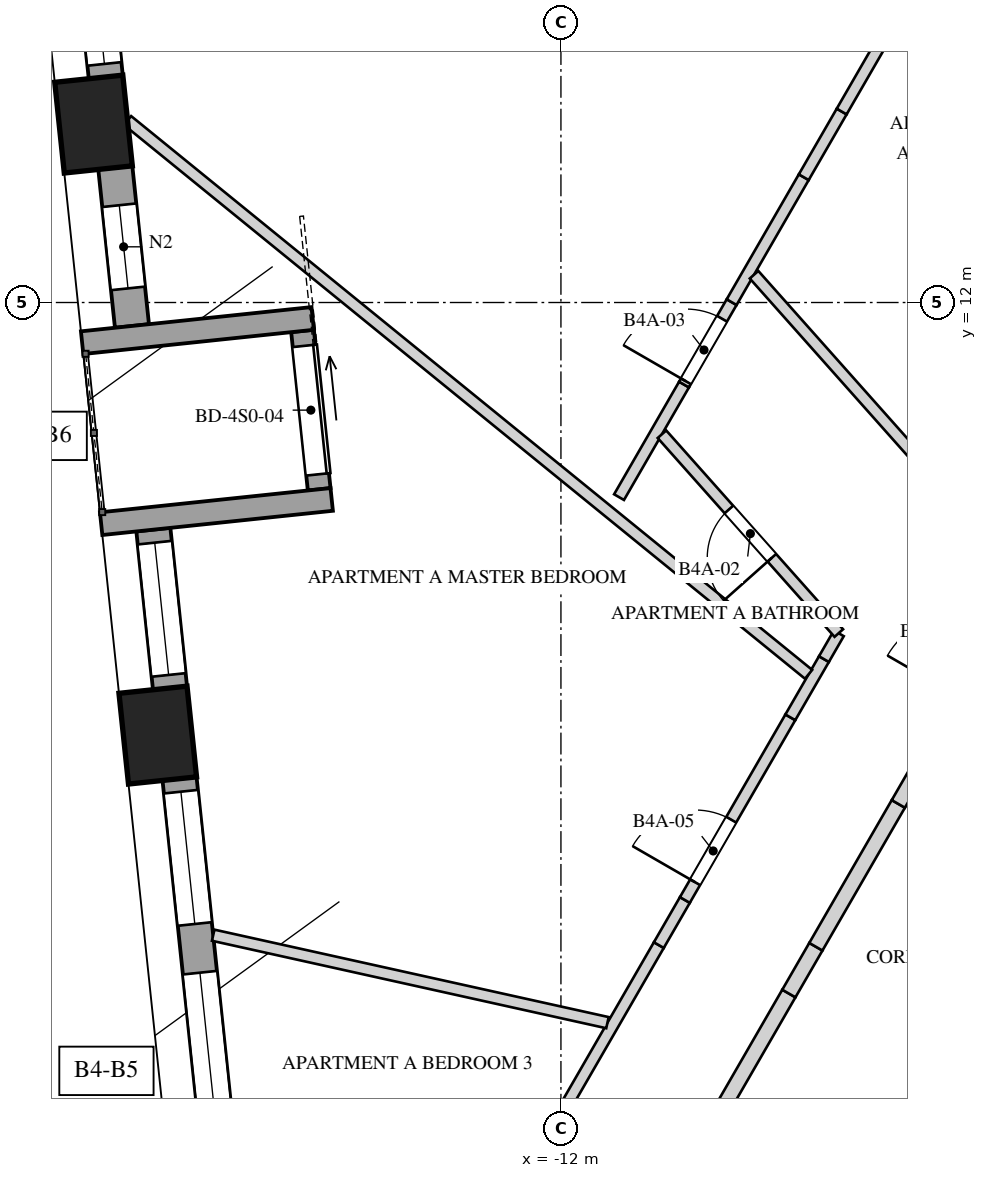
"""IFC4 building model, lengths in metres.
Left out: names, types, materials, properties, quantities, classifications, styles, units other than length and angle.
Written with IfcOpenShell. Run it as: python <this file> out.ifc"""

import sys

from ifc_helpers import new_model, si_unit, direction, frame, frame_2d, origin, origin_2d, place, context, subcontext, project, spatial, polyline, rectangle, outline, extrude, element, fill, save


model = new_model("IFC4")
c1 = context("Model", 3, precision=1e-05, world=origin(), true_north=direction((0.0, 1.0)))
c2 = subcontext(c1, "Body", "Model", "MODEL_VIEW")
j1 = project(units=[si_unit("LENGTHUNIT", "METRE"), si_unit("PLANEANGLEUNIT", "RADIAN")], contexts=[c1])
p1 = place(None, origin())
s1 = spatial("IfcSite", under=j1, at=p1, CompositionType="ELEMENT")
p2 = place(p1, origin())
s2 = spatial("IfcBuilding", under=s1, at=p2, CompositionType="ELEMENT")
p3 = place(p2, frame((0.0, 0.0, 162.8)))
s3 = spatial("IfcBuildingStorey", under=s2, at=p3, CompositionType="ELEMENT", Elevation=162.8)
p4 = place(p3, frame((-1.198, 10.575, 0.0), z_axis=(0.0, 0.0, 1.0), x_axis=(-0.499995289315, -0.866028123483, 0.0)))
e1 = element("IfcWall", 1, at=p4, inside=s3, PredefinedType="SHEAR", context=c2, shape_type="SweptSolid", body=[
    extrude(rectangle(XDim=17.118, YDim=0.85, at=frame_2d((8.559, 0.0))), origin(), (0.0, 0.0, 1.0), 4.0),
])
p5 = place(p4, frame((6.764, 0.0, 0.0)))
e2 = element("IfcOpeningElement", 2, at=p5, cuts=e1, PredefinedType="OPENING", context=c2, shape_type="SweptSolid", body=[
    extrude(rectangle(XDim=1.0, YDim=2.4, at=frame_2d((0.5, 1.2))), frame((0.0, 0.435, 0.0), z_axis=(0.0, -1.0, 0.0), x_axis=(1.0, 0.0, 0.0)), (0.0, 0.0, 1.0), 0.87),
])
p6 = place(p4, frame((14.742, 0.0, 0.0)))
e3 = element("IfcOpeningElement", 3, at=p6, cuts=e1, PredefinedType="OPENING", context=c2, shape_type="SweptSolid", body=[
    extrude(rectangle(XDim=0.8, YDim=2.1, at=frame_2d((0.4, 1.05))), frame((0.0, 0.435, 0.0), z_axis=(0.0, -1.0, 0.0), x_axis=(1.0, 0.0, 0.0)), (0.0, 0.0, 1.0), 0.87),
])
for number, where, z_axis, x_axis in (
    (4, (-18.149, 14.347, -0.35), (0.0, 0.0, 1.0), (0.105, -0.995, 0.0)),
    (5, (-17.304, 6.309, -0.35), (0.0, 0.0, 1.0), (0.105, -0.995, 0.0)),
):
    element("IfcColumn", number, at=place(p3, frame(where, z_axis=z_axis, x_axis=x_axis)), inside=s3, PredefinedType="COLUMN", context=c2, shape_type="SweptSolid", body=[
        extrude(rectangle(XDim=1.2, YDim=0.9, at=origin_2d()), origin(), (0.0, 0.0, 1.0), 4.35),
    ])
p7 = place(p3, frame((-18.634, 21.116, 0.0), z_axis=(0.0, 0.0, 1.0), x_axis=(0.104522399115, -0.994522532718, 0.0)))
e6 = element("IfcWall", 6, at=p7, inside=s3, PredefinedType="SOLIDWALL", context=c2, shape_type="SweptSolid", body=[
    extrude(rectangle(XDim=6.183, YDim=0.45, at=frame_2d((3.091, 0.0))), origin(), (0.0, 0.0, 1.0), 3.3),
])
p8 = place(p7, frame((0.147, 0.0, 0.5)))
e7 = element("IfcOpeningElement", 7, at=p8, cuts=e6, PredefinedType="OPENING", context=c2, shape_type="SweptSolid", body=[
    extrude(rectangle(XDim=1.1, YDim=2.0, at=frame_2d((0.55, 1.0))), frame((0.0, 0.235, 0.0), z_axis=(0.0, -1.0, 0.0), x_axis=(1.0, 0.0, 0.0)), (0.0, 0.0, 1.0), 0.47),
])
p9 = place(p7, frame((1.866, 0.0, 0.5)))
e8 = element("IfcOpeningElement", 8, at=p9, cuts=e6, PredefinedType="OPENING", context=c2, shape_type="SweptSolid", body=[
    extrude(rectangle(XDim=1.75, YDim=2.65, at=frame_2d((0.875, 1.325))), frame((0.0, 0.235, 0.0), z_axis=(0.0, -1.0, 0.0), x_axis=(1.0, 0.0, 0.0)), (0.0, 0.0, 1.0), 0.47),
])
p10 = place(p7, frame((4.261, 0.0, 0.5)))
e9 = element("IfcOpeningElement", 9, at=p10, cuts=e6, PredefinedType="OPENING", context=c2, shape_type="SweptSolid", body=[
    extrude(rectangle(XDim=1.75, YDim=2.65, at=frame_2d((0.875, 1.325))), frame((0.0, 0.235, 0.0), z_axis=(0.0, -1.0, 0.0), x_axis=(1.0, 0.0, 0.0)), (0.0, 0.0, 1.0), 0.47),
])
p11 = place(p3, frame((-17.863, 13.774, 0.0), z_axis=(0.0, 0.0, 1.0), x_axis=(0.104442071108, -0.994530971756, 0.0)))
e10 = element("IfcWall", 10, at=p11, inside=s3, PredefinedType="SOLIDWALL", context=c2, shape_type="SweptSolid", body=[
    extrude(rectangle(XDim=2.094, YDim=0.45, at=frame_2d((1.047, 0.0))), origin(), (0.0, 0.0, 1.0), 3.3),
])
p12 = place(p11, frame((0.497, 0.0, 0.5)))
e11 = element("IfcOpeningElement", 11, at=p12, cuts=e10, PredefinedType="OPENING", context=c2, shape_type="SweptSolid", body=[
    extrude(rectangle(XDim=1.1, YDim=2.65, at=frame_2d((0.55, 1.325))), frame((0.0, 0.235, 0.0), z_axis=(0.0, -1.0, 0.0), x_axis=(1.0, 0.0, 0.0)), (0.0, 0.0, 1.0), 0.47),
])
p13 = place(p3, frame((-17.362, 9.012, 0.0), z_axis=(0.0, 0.0, 1.0), x_axis=(0.104569484464, -0.994517583011, 0.0)))
e12 = element("IfcWall", 12, at=p13, inside=s3, PredefinedType="SOLIDWALL", context=c2, shape_type="SweptSolid", body=[
    extrude(rectangle(XDim=2.094, YDim=0.45, at=frame_2d((1.047, 0.0))), origin(), (0.0, 0.0, 1.0), 3.3),
])
p14 = place(p13, frame((0.172, 0.0, 0.5)))
e13 = element("IfcOpeningElement", 13, at=p14, cuts=e12, PredefinedType="OPENING", context=c2, shape_type="SweptSolid", body=[
    extrude(rectangle(XDim=1.75, YDim=2.65, at=frame_2d((0.875, 1.325))), frame((0.0, 0.235, 0.0), z_axis=(0.0, -1.0, 0.0), x_axis=(1.0, 0.0, 0.0)), (0.0, 0.0, 1.0), 0.47),
])
p15 = place(p3, frame((-17.018, 5.736, 0.0), z_axis=(0.0, 0.0, 1.0), x_axis=(0.104531531326, -0.994521572898, 0.0)))
e14 = element("IfcWall", 14, at=p15, inside=s3, PredefinedType="SOLIDWALL", context=c2, shape_type="SweptSolid", body=[
    extrude(rectangle(XDim=6.883, YDim=0.45, at=frame_2d((3.441, 0.0))), origin(), (0.0, 0.0, 1.0), 3.3),
])
p16 = place(p15, frame((0.172, 0.0, 0.5)))
e15 = element("IfcOpeningElement", 15, at=p16, cuts=e14, PredefinedType="OPENING", context=c2, shape_type="SweptSolid", body=[
    extrude(rectangle(XDim=1.75, YDim=2.65, at=frame_2d((0.875, 1.325))), frame((0.0, 0.235, 0.0), z_axis=(0.0, -1.0, 0.0), x_axis=(1.0, 0.0, 0.0)), (0.0, 0.0, 1.0), 0.47),
])
p17 = place(p15, frame((2.566, 0.0, 0.5)))
e16 = element("IfcOpeningElement", 16, at=p17, cuts=e14, PredefinedType="OPENING", context=c2, shape_type="SweptSolid", body=[
    extrude(rectangle(XDim=1.75, YDim=2.65, at=frame_2d((0.875, 1.325))), frame((0.0, 0.235, 0.0), z_axis=(0.0, -1.0, 0.0), x_axis=(1.0, 0.0, 0.0)), (0.0, 0.0, 1.0), 0.47),
])
p18 = place(p15, frame((4.961, 0.0, 0.5)))
e17 = element("IfcOpeningElement", 17, at=p18, cuts=e14, PredefinedType="OPENING", context=c2, shape_type="SweptSolid", body=[
    extrude(rectangle(XDim=1.75, YDim=2.65, at=frame_2d((0.875, 1.325))), frame((0.0, 0.235, 0.0), z_axis=(0.0, -1.0, 0.0), x_axis=(1.0, 0.0, 0.0)), (0.0, 0.0, 1.0), 0.47),
])
p19 = place(p3, frame((-15.4, 11.625, 0.0), z_axis=(0.0, 0.0, 1.0), x_axis=(0.104569484464, -0.994517583011, 0.0)))
e18 = element("IfcWall", 18, at=p19, inside=s3, PredefinedType="SOLIDWALL", context=c2, shape_type="SweptSolid", body=[
    extrude(rectangle(XDim=2.094, YDim=0.3, at=frame_2d((1.047, 0.0))), origin(), (0.0, 0.0, 1.0), 3.3),
])
p20 = place(p19, frame((0.197, 0.0, 0.0)))
e19 = element("IfcOpeningElement", 19, at=p20, cuts=e18, PredefinedType="OPENING", context=c2, shape_type="SweptSolid", body=[
    extrude(rectangle(XDim=1.7, YDim=2.45, at=frame_2d((0.85, 1.225))), frame((0.0, 0.16, 0.0), z_axis=(0.0, -1.0, 0.0), x_axis=(1.0, 0.0, 0.0)), (0.0, 0.0, 1.0), 0.32),
])
for number, where, z_axis, x_axis in (
    (20, (-18.299, 11.471, 0.0), (0.0, 0.0, 1.0), (0.995, 0.105, 0.0)),
    (21, (-18.049, 9.09, 0.0), (0.0, 0.0, 1.0), (0.995, 0.105, 0.0)),
):
    element("IfcWall", number, at=place(p3, frame(where, z_axis=z_axis, x_axis=x_axis)), inside=s3, PredefinedType="SOLIDWALL", context=c2, shape_type="SweptSolid", body=[
        extrude(rectangle(XDim=3.05, YDim=0.3, at=frame_2d((1.525, 0.0))), origin(), (0.0, 0.0, 1.0), 3.3),
    ])
p21 = place(p3, frame((-13.375, -1.066, 0.0), z_axis=(0.0, 0.0, 1.0), x_axis=(0.500004172341, 0.866022994869, 0.0)))
e22 = element("IfcWall", 22, at=p21, inside=s3, PredefinedType="PARTITIONING", context=c2, shape_type="SweptSolid", body=[
    extrude(rectangle(XDim=5.326, YDim=0.15, at=frame_2d((2.663, 0.0))), origin(), (0.0, 0.0, 1.0), 3.65),
])
p22 = place(p21, frame((1.479, 0.0, 0.0)))
e23 = element("IfcOpeningElement", 23, at=p22, cuts=e22, PredefinedType="OPENING", context=c2, shape_type="SweptSolid", body=[
    extrude(rectangle(XDim=0.95, YDim=2.4, at=frame_2d((0.475, 1.2))), frame((0.0, 0.085, 0.0), z_axis=(0.0, -1.0, 0.0), x_axis=(1.0, 0.0, 0.0)), (0.0, 0.0, 1.0), 0.17),
])
p23 = place(p3, frame((-10.712, 3.546, 0.0), z_axis=(0.0, 0.0, 1.0), x_axis=(0.50012328804, 0.865954211699, 0.0)))
e24 = element("IfcWall", 24, at=p23, inside=s3, PredefinedType="PARTITIONING", context=c2, shape_type="SweptSolid", body=[
    extrude(rectangle(XDim=0.685, YDim=0.15, at=frame_2d((0.343, 0.0))), origin(), (0.0, 0.0, 1.0), 2.95),
])
p24 = place(p3, frame((-10.369, 4.14, 0.0), z_axis=(0.0, 0.0, 1.0), x_axis=(0.50000932403, 0.866020020486, 0.0)))
e25 = element("IfcWall", 25, at=p24, inside=s3, PredefinedType="PARTITIONING", context=c2, shape_type="SweptSolid", body=[
    extrude(rectangle(XDim=2.775, YDim=0.15, at=frame_2d((1.387, 0.0))), origin(), (0.0, 0.0, 1.0), 3.65),
])
p25 = place(p24, frame((0.27, 0.0, 0.0)))
e26 = element("IfcOpeningElement", 26, at=p25, cuts=e25, PredefinedType="OPENING", context=c2, shape_type="SweptSolid", body=[
    extrude(rectangle(XDim=0.95, YDim=2.4, at=frame_2d((0.475, 1.2))), frame((0.0, 0.085, 0.0), z_axis=(0.0, -1.0, 0.0), x_axis=(1.0, 0.0, 0.0)), (0.0, 0.0, 1.0), 0.17),
])
p26 = place(p3, frame((-8.982, 6.543, 0.0), z_axis=(0.0, 0.0, 1.0), x_axis=(0.499969398072, 0.866043071095, 0.0)))
e27 = element("IfcWall", 27, at=p26, inside=s3, PredefinedType="PARTITIONING", context=c2, shape_type="SweptSolid", body=[
    extrude(rectangle(XDim=0.884, YDim=0.15, at=frame_2d((0.442, 0.0))), origin(), (0.0, 0.0, 1.0), 2.55),
])
p27 = place(p3, frame((-8.54, 7.309, 0.0), z_axis=(0.0, 0.0, 1.0), x_axis=(0.499758416753, 0.866164837017, 0.0)))
e28 = element("IfcWall", 28, at=p27, inside=s3, PredefinedType="PARTITIONING", context=c2, shape_type="SweptSolid", body=[
    extrude(rectangle(XDim=0.392, YDim=0.15, at=frame_2d((0.196, 0.0))), origin(), (0.0, 0.0, 1.0), 3.65),
])
p28 = place(p3, frame((-11.235, 9.44, 0.0), z_axis=(0.0, 0.0, 1.0), x_axis=(0.499977863513, 0.866038183914, 0.0)))
e29 = element("IfcWall", 29, at=p28, inside=s3, PredefinedType="PARTITIONING", context=c2, shape_type="SweptSolid", body=[
    extrude(rectangle(XDim=1.71, YDim=0.15, at=frame_2d((0.855, 0.0))), origin(), (0.0, 0.0, 1.0), 3.65),
])
p29 = place(p3, frame((-10.38, 10.921, 0.0), z_axis=(0.0, 0.0, 1.0), x_axis=(0.499998165157, 0.866026463129, 0.0)))
e30 = element("IfcWall", 30, at=p29, inside=s3, PredefinedType="PARTITIONING", context=c2, shape_type="SweptSolid", body=[
    extrude(outline(polyline([(0.0, 0.0), (1.252, 0.0), (1.252, 2.55), (0.325, 2.55), (0.325, 3.65), (0.0, 3.65), (0.0, 0.0)])), frame((0.0, 0.075, 0.0), z_axis=(0.0, -1.0, 0.0), x_axis=(1.0, 0.0, 0.0)), (0.0, 0.0, 1.0), 0.15),
])
p30 = place(p29, frame((0.05, 0.0, 0.0)))
e31 = element("IfcOpeningElement", 31, at=p30, cuts=e30, PredefinedType="OPENING", context=c2, shape_type="SweptSolid", body=[
    extrude(rectangle(XDim=0.95, YDim=2.4, at=frame_2d((0.475, 1.2))), frame((0.0, 0.085, 0.0), z_axis=(0.0, -1.0, 0.0), x_axis=(1.0, 0.0, 0.0)), (0.0, 0.0, 1.0), 0.17),
])
p31 = place(p3, frame((-9.754, 12.005, 0.0), z_axis=(0.0, 0.0, 1.0), x_axis=(0.499971120268, 0.866042076863, 0.0)))
e32 = element("IfcWall", 32, at=p31, inside=s3, PredefinedType="PARTITIONING", context=c2, shape_type="SweptSolid", body=[
    extrude(rectangle(XDim=1.898, YDim=0.15, at=frame_2d((0.949, 0.0))), origin(), (0.0, 0.0, 1.0), 3.65),
])
p32 = place(p3, frame((-8.805, 13.649, 0.0), z_axis=(0.0, 0.0, 1.0), x_axis=(0.499955472713, 0.866051110099, 0.0)))
e33 = element("IfcWall", 33, at=p32, inside=s3, PredefinedType="PARTITIONING", context=c2, shape_type="SweptSolid", body=[
    extrude(rectangle(XDim=0.998, YDim=0.15, at=frame_2d((0.499, 0.0))), origin(), (0.0, 0.0, 1.0), 2.55),
])
p33 = place(p3, frame((-8.307, 14.513, 0.0), z_axis=(0.0, 0.0, 1.0), x_axis=(0.500034855457, 0.866005279042, 0.0)))
e34 = element("IfcWall", 34, at=p33, inside=s3, PredefinedType="PARTITIONING", context=c2, shape_type="SweptSolid", body=[
    extrude(rectangle(XDim=3.067, YDim=0.15, at=frame_2d((1.533, 0.0))), origin(), (0.0, 0.0, 1.0), 3.65),
])
p34 = place(p3, frame((-11.388, 2.526, 0.0), z_axis=(0.0, 0.0, 1.0), x_axis=(-0.976268081413, 0.216565540229, 0.0)))
e35 = element("IfcWall", 35, at=p34, inside=s3, PredefinedType="PARTITIONING", context=c2, shape_type="SweptSolid", body=[
    extrude(rectangle(XDim=5.313, YDim=0.15, at=frame_2d((2.656, 0.0))), origin(), (0.0, 0.0, 1.0), 3.65),
])
p35 = place(p3, frame((-9.459, 12.366, 0.0), z_axis=(0.0, 0.0, 1.0), x_axis=(0.664589031093, -0.747209087037, 0.0)))
e36 = element("IfcWall", 36, at=p35, inside=s3, PredefinedType="PARTITIONING", context=c2, shape_type="SweptSolid", body=[
    extrude(rectangle(XDim=3.499, YDim=0.15, at=frame_2d((1.75, 0.0))), origin(), (0.0, 0.0, 1.0), 3.65),
])
p36 = place(p3, frame((-8.742, 7.109, 0.0), z_axis=(0.0, 0.0, 1.0), x_axis=(-0.775864969599, 0.630899000593, 0.0)))
e37 = element("IfcWall", 37, at=p36, inside=s3, PredefinedType="PARTITIONING", context=c2, shape_type="SweptSolid", body=[
    extrude(rectangle(XDim=11.548, YDim=0.15, at=frame_2d((5.774, 0.0))), origin(), (0.0, 0.0, 1.0), 2.55),
])
p37 = place(p3, frame((-8.344, 7.651, 0.0), z_axis=(0.0, 0.0, 1.0), x_axis=(-0.664580231794, 0.747216913292, 0.0)))
e38 = element("IfcWall", 38, at=p37, inside=s3, PredefinedType="PARTITIONING", context=c2, shape_type="SweptSolid", body=[
    extrude(rectangle(XDim=3.501, YDim=0.15, at=frame_2d((1.75, 0.0))), origin(), (0.0, 0.0, 1.0), 3.65),
])
p38 = place(p37, frame((1.325, 0.0, 0.0)))
e39 = element("IfcOpeningElement", 39, at=p38, cuts=e38, PredefinedType="OPENING", context=c2, shape_type="SweptSolid", body=[
    extrude(rectangle(XDim=0.85, YDim=2.4, at=frame_2d((0.425, 1.2))), frame((0.0, 0.085, 0.0), z_axis=(0.0, -1.0, 0.0), x_axis=(1.0, 0.0, 0.0)), (0.0, 0.0, 1.0), 0.17),
])
p39 = place(p3, frame((-8.22, 21.283, 0.0), z_axis=(0.0, 0.0, 1.0), x_axis=(0.360262770677, -0.932850864857, 0.0)))
e40 = element("IfcWall", 40, at=p39, inside=s3, PredefinedType="PARTITIONING", context=c2, shape_type="SweptSolid", body=[
    extrude(rectangle(XDim=8.524, YDim=0.15, at=frame_2d((4.262, 0.0))), origin(), (0.0, 0.0, 1.0), 2.75),
])
p40 = place(p3, frame((-11.155, -0.821, 0.0), z_axis=(0.0, 0.0, 1.0), x_axis=(0.499992344383, 0.866029823712, 0.0)))
e41 = element("IfcWall", 41, at=p40, inside=s3, PredefinedType="SOLIDWALL", context=c2, shape_type="SweptSolid", body=[
    extrude(rectangle(XDim=4.307, YDim=0.2, at=frame_2d((2.153, 0.0))), origin(), (0.0, 0.0, 1.0), 3.65),
])
p41 = place(p3, frame((-9.001, 2.909, 0.0), z_axis=(0.0, 0.0, 1.0), x_axis=(0.50012879774, 0.865951029603, 0.0)))
e42 = element("IfcWall", 42, at=p41, inside=s3, PredefinedType="SOLIDWALL", context=c2, shape_type="SweptSolid", body=[
    extrude(rectangle(XDim=0.711, YDim=0.2, at=frame_2d((0.355, 0.0))), origin(), (0.0, 0.0, 1.0), 2.95),
])
p42 = place(p3, frame((-8.646, 3.525, 0.0), z_axis=(0.0, 0.0, 1.0), x_axis=(0.499975720793, 0.866039420937, 0.0)))
e43 = element("IfcWall", 43, at=p42, inside=s3, PredefinedType="SOLIDWALL", context=c2, shape_type="SweptSolid", body=[
    extrude(rectangle(XDim=2.169, YDim=0.2, at=frame_2d((1.085, 0.0))), origin(), (0.0, 0.0, 1.0), 3.65),
])
p43 = place(p3, frame((-7.561, 5.404, 0.0), z_axis=(0.0, 0.0, 1.0), x_axis=(0.499977996243, 0.866038107287, 0.0)))
e44 = element("IfcWall", 44, at=p43, inside=s3, PredefinedType="SOLIDWALL", context=c2, shape_type="SweptSolid", body=[
    extrude(rectangle(XDim=0.91, YDim=0.2, at=frame_2d((0.455, 0.0))), origin(), (0.0, 0.0, 1.0), 2.55),
])
p44 = place(p10, origin())
e45 = element("IfcWindow", 45, at=p44, inside=s3, PartitioningType="SINGLE_PANEL", PredefinedType="WINDOW", context=c2, shape_type="SweptSolid", body=[
    extrude(rectangle(XDim=1.75, YDim=2.65, at=frame_2d((0.875, 1.325))), frame((0.0, 0.03, 0.0), z_axis=(0.0, -1.0, 0.0), x_axis=(1.0, 0.0, 0.0)), (0.0, 0.0, 1.0), 0.06),
])
fill(e9, e45)
p45 = place(p12, origin())
e46 = element("IfcWindow", 46, at=p45, inside=s3, PartitioningType="SINGLE_PANEL", PredefinedType="WINDOW", context=c2, shape_type="SweptSolid", body=[
    extrude(rectangle(XDim=1.1, YDim=2.65, at=frame_2d((0.55, 1.325))), frame((0.0, 0.03, 0.0), z_axis=(0.0, -1.0, 0.0), x_axis=(1.0, 0.0, 0.0)), (0.0, 0.0, 1.0), 0.06),
])
fill(e11, e46)
p46 = place(p14, origin())
e47 = element("IfcWindow", 47, at=p46, inside=s3, PartitioningType="SINGLE_PANEL", PredefinedType="WINDOW", context=c2, shape_type="SweptSolid", body=[
    extrude(rectangle(XDim=1.75, YDim=2.65, at=frame_2d((0.875, 1.325))), frame((0.0, 0.03, 0.0), z_axis=(0.0, -1.0, 0.0), x_axis=(1.0, 0.0, 0.0)), (0.0, 0.0, 1.0), 0.06),
])
fill(e13, e47)
p47 = place(p16, origin())
e48 = element("IfcWindow", 48, at=p47, inside=s3, PartitioningType="SINGLE_PANEL", PredefinedType="WINDOW", context=c2, shape_type="SweptSolid", body=[
    extrude(rectangle(XDim=1.75, YDim=2.65, at=frame_2d((0.875, 1.325))), frame((0.0, 0.03, 0.0), z_axis=(0.0, -1.0, 0.0), x_axis=(1.0, 0.0, 0.0)), (0.0, 0.0, 1.0), 0.06),
])
fill(e15, e48)
p48 = place(p17, origin())
e49 = element("IfcWindow", 49, at=p48, inside=s3, PartitioningType="SINGLE_PANEL", PredefinedType="WINDOW", context=c2, shape_type="SweptSolid", body=[
    extrude(rectangle(XDim=1.75, YDim=2.65, at=frame_2d((0.875, 1.325))), frame((0.0, 0.03, 0.0), z_axis=(0.0, -1.0, 0.0), x_axis=(1.0, 0.0, 0.0)), (0.0, 0.0, 1.0), 0.06),
])
fill(e16, e49)
p49 = place(p20, origin())
e50 = element("IfcDoor", 50, at=p49, inside=s3, OperationType="SLIDING_TO_LEFT", PredefinedType="DOOR", context=c2, shape_type="SweptSolid", body=[
    extrude(rectangle(XDim=1.7, YDim=2.45, at=frame_2d((0.85, 1.225))), frame((0.0, 0.025, 0.0), z_axis=(0.0, -1.0, 0.0), x_axis=(1.0, 0.0, 0.0)), (0.0, 0.0, 1.0), 0.05),
])
fill(e19, e50)
p50 = place(p38, origin())
e51 = element("IfcDoor", 51, at=p50, inside=s3, OperationType="SINGLE_SWING_RIGHT", PredefinedType="DOOR", context=c2, shape_type="SweptSolid", body=[
    extrude(rectangle(XDim=0.85, YDim=2.4, at=frame_2d((0.425, 1.2))), frame((0.0, 0.025, 0.0), z_axis=(0.0, -1.0, 0.0), x_axis=(1.0, 0.0, 0.0)), (0.0, 0.0, 1.0), 0.05),
])
fill(e39, e51)
p51 = place(p30, origin())
e52 = element("IfcDoor", 52, at=p51, inside=s3, OperationType="SINGLE_SWING_LEFT", PredefinedType="DOOR", context=c2, shape_type="SweptSolid", body=[
    extrude(rectangle(XDim=0.95, YDim=2.4, at=frame_2d((0.475, 1.2))), frame((0.0, 0.025, 0.0), z_axis=(0.0, -1.0, 0.0), x_axis=(1.0, 0.0, 0.0)), (0.0, 0.0, 1.0), 0.05),
])
fill(e31, e52)
p52 = place(p25, origin())
e53 = element("IfcDoor", 53, at=p52, inside=s3, OperationType="SINGLE_SWING_LEFT", PredefinedType="DOOR", context=c2, shape_type="SweptSolid", body=[
    extrude(rectangle(XDim=0.95, YDim=2.4, at=frame_2d((0.475, 1.2))), frame((0.0, 0.025, 0.0), z_axis=(0.0, -1.0, 0.0), x_axis=(1.0, 0.0, 0.0)), (0.0, 0.0, 1.0), 0.05),
])
fill(e26, e53)
save(model, sys.argv[1])
